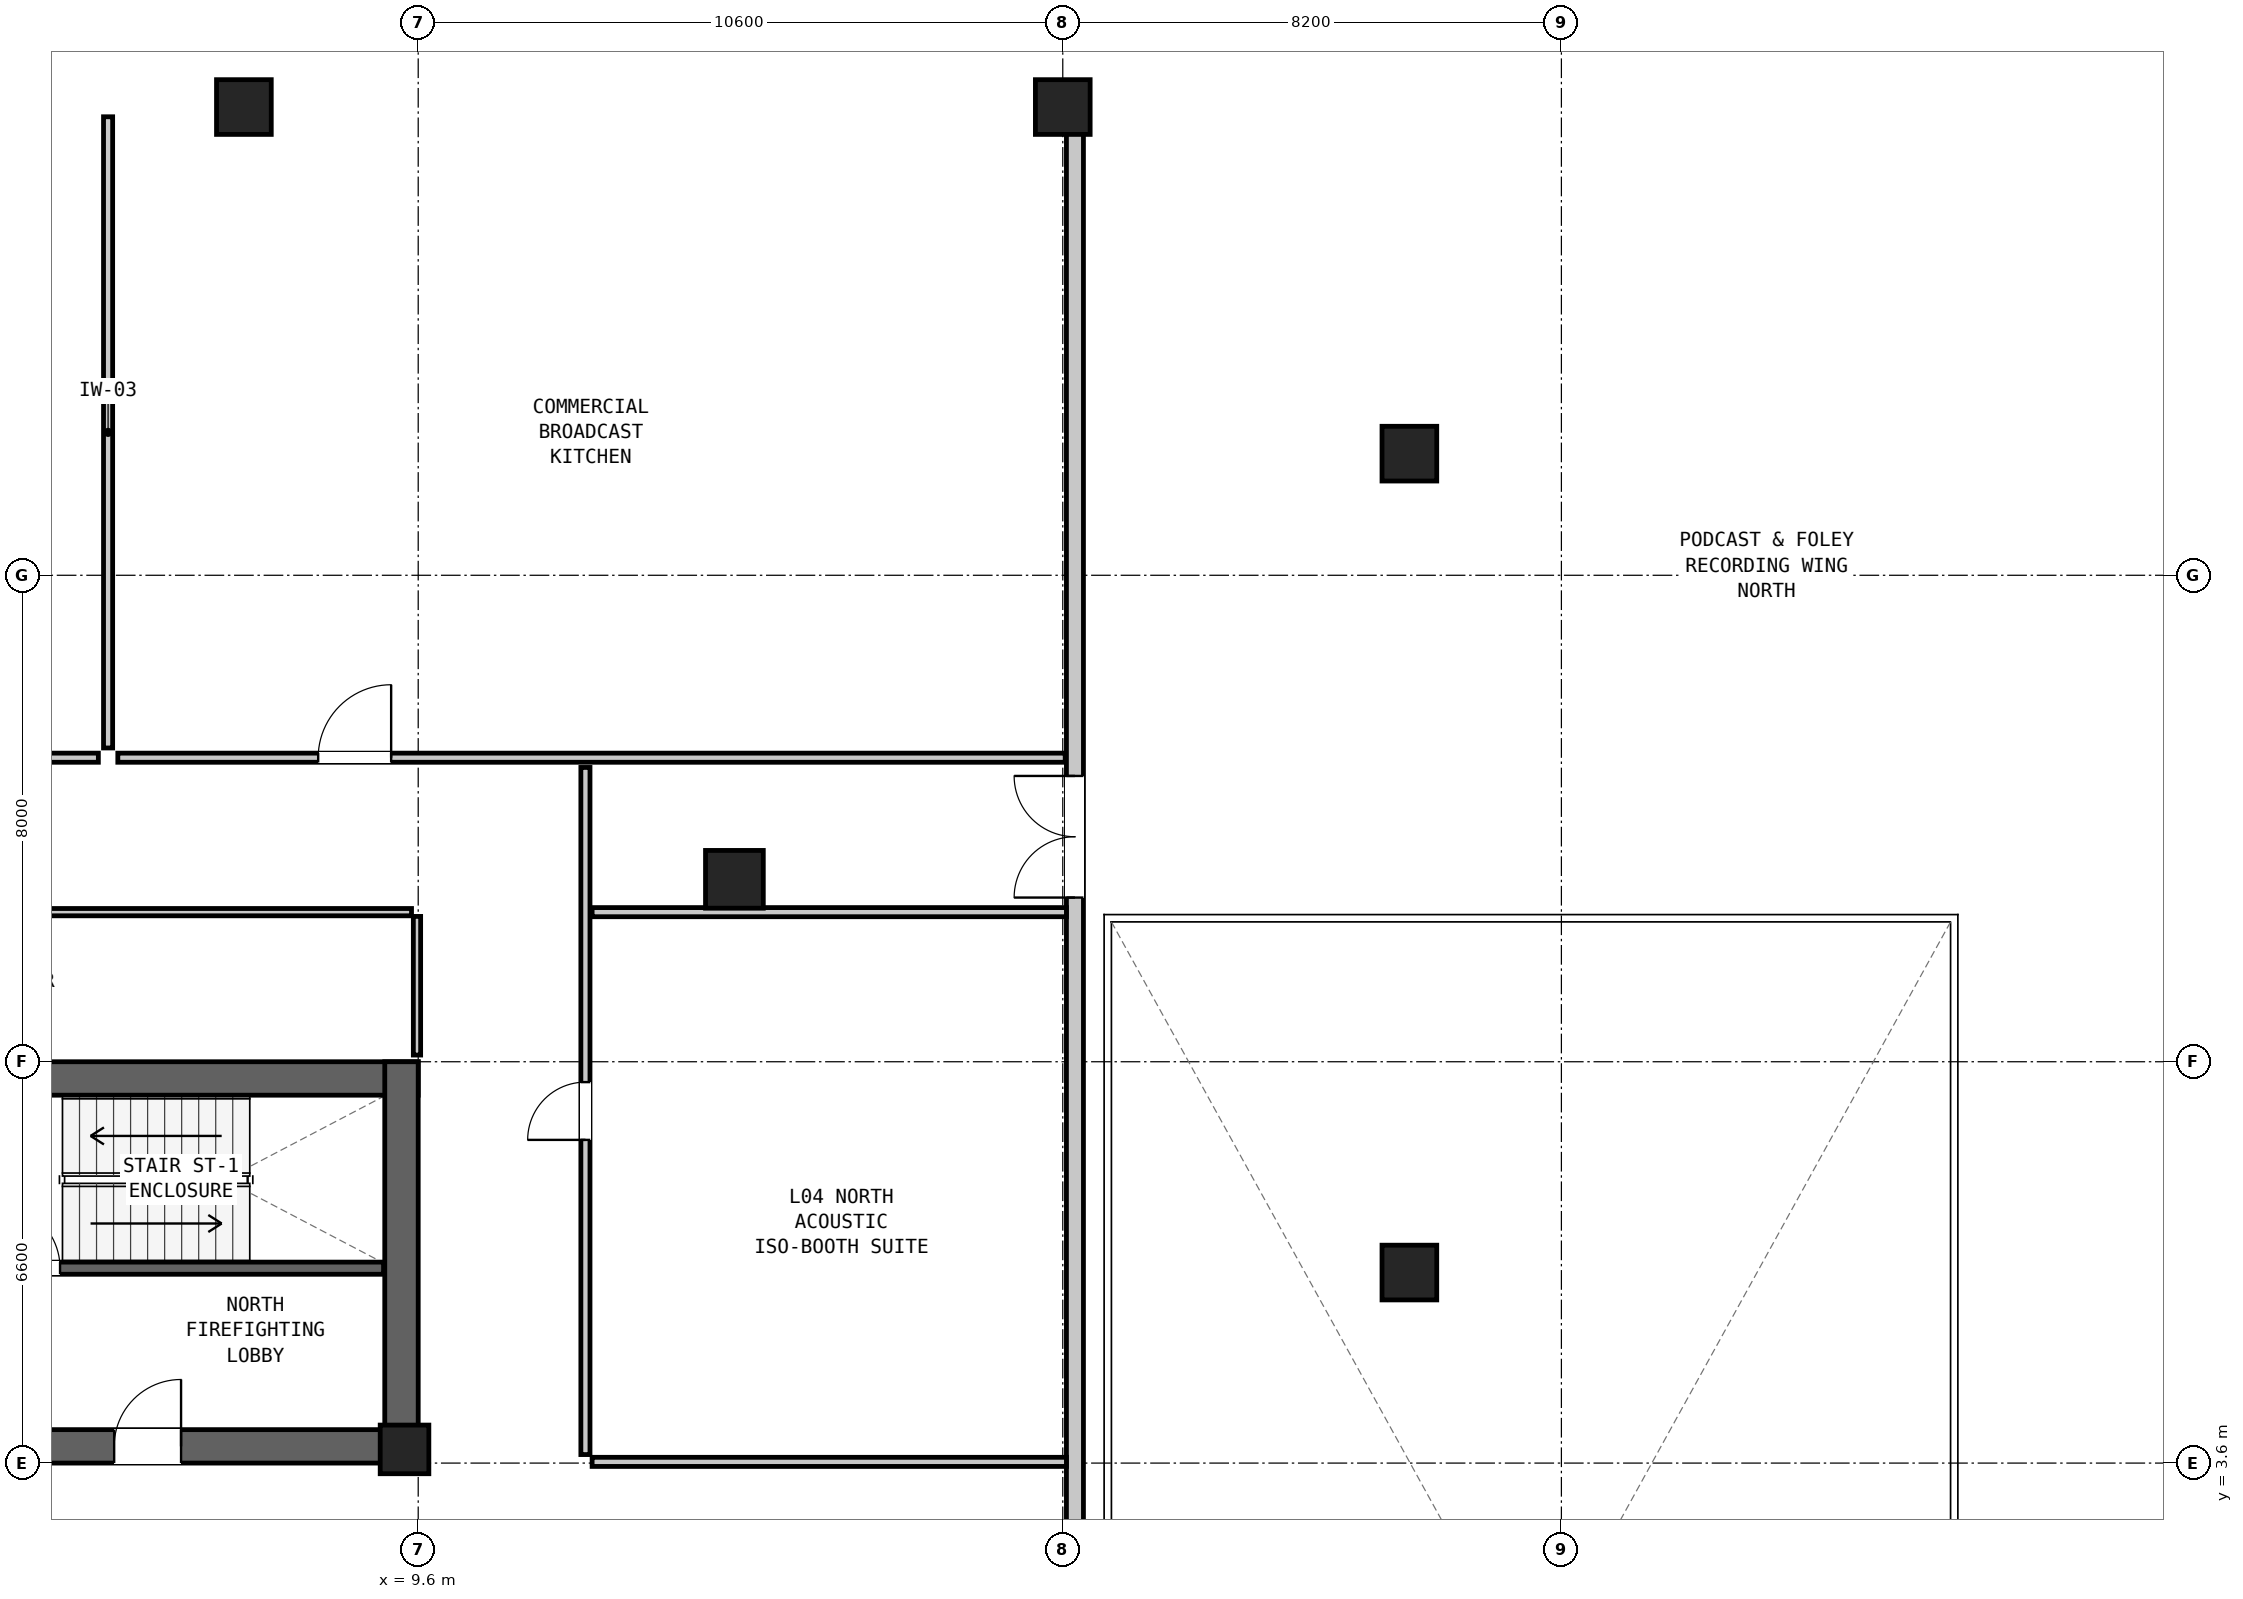
"""IFC4 building model, lengths in metres.
Left out: names, types, materials, properties, quantities, classifications, styles, units other than length and angle.
Written with IfcOpenShell. Run it as: python <this file> out.ifc"""

import sys

from ifc_helpers import new_model, si_unit, direction, frame, frame_2d, origin, origin_2d, place, context, subcontext, project, spatial, rectangle, hollow_rectangle, extrude, element, fill, save


model = new_model("IFC4")
c1 = context("Model", 3, precision=1e-05, world=origin(), true_north=direction((0.0, 1.0)))
c2 = subcontext(c1, "Body", "Model", "MODEL_VIEW")
j1 = project(units=[si_unit("LENGTHUNIT", "METRE"), si_unit("PLANEANGLEUNIT", "RADIAN")], contexts=[c1])
p1 = place(None, origin())
s1 = spatial("IfcSite", under=j1, at=p1, CompositionType="ELEMENT")
p2 = place(p1, origin())
s2 = spatial("IfcBuilding", under=s1, at=p2, CompositionType="ELEMENT")
p3 = place(p2, frame((0.0, 0.0, 17.7)))
s3 = spatial("IfcBuildingStorey", under=s2, at=p3, CompositionType="ELEMENT", Elevation=17.7)
p4 = place(p3, frame((-9.6, 9.925, 0.0), z_axis=(0.0, 0.0, 1.0), x_axis=(1.0, 0.0, 0.0)))
e1 = element("IfcWall", 1, at=p4, inside=s3, PredefinedType="SHEAR", context=c2, shape_type="SweptSolid", body=[
    extrude(rectangle(XDim=19.2, YDim=0.55, at=frame_2d((9.6, 0.0))), origin(), (0.0, 0.0, 1.0), 4.2),
])
p5 = place(p3, frame((-9.6, 3.875, 0.0), z_axis=(0.0, 0.0, 1.0), x_axis=(1.0, 0.0, 0.0)))
e2 = element("IfcWall", 2, at=p5, inside=s3, PredefinedType="SHEAR", context=c2, shape_type="SweptSolid", body=[
    extrude(rectangle(XDim=19.2, YDim=0.55, at=frame_2d((9.6, 0.0))), origin(), (0.0, 0.0, 1.0), 4.2),
])
p6 = place(p5, frame((14.2, 0.0, 0.0)))
e3 = element("IfcOpeningElement", 3, at=p6, cuts=e2, PredefinedType="OPENING", context=c2, shape_type="SweptSolid", body=[
    extrude(rectangle(XDim=1.1, YDim=2.08, at=frame_2d((0.55, 1.04))), frame((0.0, 0.287, 0.0), z_axis=(0.0, -1.0, 0.0), x_axis=(1.0, 0.0, 0.0)), (0.0, 0.0, 1.0), 0.574),
])
p7 = place(p5, frame((8.2, 0.0, 0.0)))
e4 = element("IfcOpeningElement", 4, at=p7, cuts=e2, PredefinedType="OPENING", context=c2, shape_type="SweptSolid", body=[
    extrude(rectangle(XDim=1.15, YDim=2.1, at=frame_2d((0.575, 1.05))), frame((0.0, 0.287, 0.0), z_axis=(0.0, -1.0, 0.0), x_axis=(1.0, 0.0, 0.0)), (0.0, 0.0, 1.0), 0.574),
])
p8 = place(p5, frame((2.5, 0.0, 0.0)))
e5 = element("IfcOpeningElement", 5, at=p8, cuts=e2, PredefinedType="OPENING", context=c2, shape_type="SweptSolid", body=[
    extrude(rectangle(XDim=1.6, YDim=2.12, at=frame_2d((0.8, 1.06))), frame((0.0, 0.287, 0.0), z_axis=(0.0, -1.0, 0.0), x_axis=(1.0, 0.0, 0.0)), (0.0, 0.0, 1.0), 0.574),
])
p9 = place(p3, frame((9.325, 3.6, 0.0), z_axis=(0.0, 0.0, 1.0), x_axis=(0.0, 1.0, 0.0)))
e6 = element("IfcWall", 6, at=p9, inside=s3, PredefinedType="SHEAR", context=c2, shape_type="SweptSolid", body=[
    extrude(rectangle(XDim=6.6, YDim=0.55, at=frame_2d((3.3, 0.0))), origin(), (0.0, 0.0, 1.0), 4.2),
])
p10 = place(p3, frame((14.8, 13.2, 0.0), z_axis=(0.0, 0.0, 1.0), x_axis=(1.0, 0.0, 0.0)))
e7 = element("IfcColumn", 7, at=p10, inside=s3, PredefinedType="COLUMN", context=c2, shape_type="SweptSolid", body=[
    extrude(hollow_rectangle(XDim=0.95, YDim=0.95, WallThickness=0.06, at=origin_2d()), origin(), (0.0, 0.0, 1.0), 4.2),
])
for number, where, z_axis, x_axis in (
    (8, (25.9, 6.733, 0.0), (0.0, 0.0, 1.0), (0.0, 1.0, 0.0)),
    (9, (25.9, 20.2, 0.0), (0.0, 0.0, 1.0), (0.0, 1.0, 0.0)),
    (10, (20.2, 25.9, 0.0), (0.0, 0.0, 1.0), (1.0, 0.0, 0.0)),
    (11, (6.733, 25.9, 0.0), (0.0, 0.0, 1.0), (1.0, 0.0, 0.0)),
):
    element("IfcColumn", number, at=place(p3, frame(where, z_axis=z_axis, x_axis=x_axis)), inside=s3, PredefinedType="COLUMN", context=c2, shape_type="SweptSolid", body=[
        extrude(hollow_rectangle(XDim=0.9, YDim=0.9, WallThickness=0.055, at=origin_2d()), origin(), (0.0, 0.0, 1.0), 4.2),
    ])
p11 = place(p3, frame((9.375, 3.825, 0.0), z_axis=(0.0, 0.0, 1.0), x_axis=(1.0, 0.0, 0.0)))
e12 = element("IfcColumn", 12, at=p11, inside=s3, PredefinedType="COLUMN", context=c2, shape_type="SweptSolid", body=[
    extrude(rectangle(XDim=0.8, YDim=0.8, at=origin_2d()), origin(), (0.0, 0.0, 1.0), 4.2),
])
p12 = place(p3, frame((2.36, 6.805, 0.0), z_axis=(0.0, 0.0, 1.0), x_axis=(1.0, 0.0, 0.0)))
e13 = element("IfcWall", 13, at=p12, inside=s3, PredefinedType="SHEAR", context=c2, shape_type="SweptSolid", body=[
    extrude(rectangle(XDim=6.67, YDim=0.2, at=frame_2d((3.335, 0.0))), origin(), (0.0, 0.0, 1.0), 3.82),
])
p13 = place(p12, frame((0.3, 0.0, 0.0)))
e14 = element("IfcOpeningElement", 14, at=p13, cuts=e13, PredefinedType="OPENING", context=c2, shape_type="SweptSolid", body=[
    extrude(rectangle(XDim=1.05, YDim=2.08, at=frame_2d((0.525, 1.04))), frame((0.0, 0.112, 0.0), z_axis=(0.0, -1.0, 0.0), x_axis=(1.0, 0.0, 0.0)), (0.0, 0.0, 1.0), 0.224),
])
p14 = place(p3, frame((20.4, -25.74, 0.0), z_axis=(0.0, 0.0, 1.0), x_axis=(0.0, 1.0, 0.0)))
e15 = element("IfcWall", 15, at=p14, inside=s3, PredefinedType="MOVABLE", context=c2, shape_type="SweptSolid", body=[
    extrude(rectangle(XDim=51.48, YDim=0.28, at=frame_2d((25.74, 0.0))), origin(), (0.0, 0.0, 1.0), 3.193),
])
p15 = place(p14, frame((11.149, 0.0, 0.0)))
e16 = element("IfcOpeningElement", 16, at=p15, cuts=e15, PredefinedType="OPENING", context=c2, shape_type="SweptSolid", body=[
    extrude(rectangle(XDim=2.0, YDim=2.14, at=frame_2d((1.0, 1.07))), frame((0.0, 0.152, 0.0), z_axis=(0.0, -1.0, 0.0), x_axis=(1.0, 0.0, 0.0)), (0.0, 0.0, 1.0), 0.304),
])
p16 = place(p14, frame((38.64, 0.0, 0.0)))
e17 = element("IfcOpeningElement", 17, at=p16, cuts=e15, PredefinedType="OPENING", context=c2, shape_type="SweptSolid", body=[
    extrude(rectangle(XDim=2.0, YDim=2.14, at=frame_2d((1.0, 1.07))), frame((0.0, 0.152, 0.0), z_axis=(0.0, -1.0, 0.0), x_axis=(1.0, 0.0, 0.0)), (0.0, 0.0, 1.0), 0.304),
])
p17 = place(p3, frame((-28.24, 15.2, 0.0), z_axis=(0.0, 0.0, 1.0), x_axis=(1.0, 0.0, 0.0)))
e18 = element("IfcWall", 18, at=p17, inside=s3, PredefinedType="PARTITIONING", context=c2, shape_type="SweptSolid", body=[
    extrude(rectangle(XDim=32.58, YDim=0.15, at=frame_2d((16.29, 0.0))), origin(), (0.0, 0.0, 1.0), 3.82),
])
p18 = place(p17, frame((24.812, 0.0, 0.0)))
e19 = element("IfcOpeningElement", 19, at=p18, cuts=e18, PredefinedType="OPENING", context=c2, shape_type="SweptSolid", body=[
    extrude(rectangle(XDim=1.2, YDim=2.1, at=frame_2d((0.6, 1.05))), frame((0.0, 0.087, 0.0), z_axis=(0.0, -1.0, 0.0), x_axis=(1.0, 0.0, 0.0)), (0.0, 0.0, 1.0), 0.174),
])
p19 = place(p3, frame((4.66, 15.2, 0.0), z_axis=(0.0, 0.0, 1.0), x_axis=(1.0, 0.0, 0.0)))
e20 = element("IfcWall", 20, at=p19, inside=s3, PredefinedType="PARTITIONING", context=c2, shape_type="SweptSolid", body=[
    extrude(rectangle(XDim=15.58, YDim=0.15, at=frame_2d((7.79, 0.0))), origin(), (0.0, 0.0, 1.0), 3.82),
])
p20 = place(p19, frame((3.295, 0.0, 0.0)))
e21 = element("IfcOpeningElement", 21, at=p20, cuts=e20, PredefinedType="OPENING", context=c2, shape_type="SweptSolid", body=[
    extrude(rectangle(XDim=1.2, YDim=2.1, at=frame_2d((0.6, 1.05))), frame((0.0, 0.087, 0.0), z_axis=(0.0, -1.0, 0.0), x_axis=(1.0, 0.0, 0.0)), (0.0, 0.0, 1.0), 0.174),
])
p21 = place(p3, frame((4.5, 15.36, 0.0), z_axis=(0.0, 0.0, 1.0), x_axis=(0.0, 1.0, 0.0)))
e22 = element("IfcWall", 22, at=p21, inside=s3, PredefinedType="PARTITIONING", context=c2, shape_type="SweptSolid", body=[
    extrude(rectangle(XDim=10.38, YDim=0.15, at=frame_2d((5.19, 0.0))), origin(), (0.0, 0.0, 1.0), 3.82),
])
p22 = place(p3, frame((12.35, 3.74, 0.0), z_axis=(0.0, 0.0, 1.0), x_axis=(0.0, 1.0, 0.0)))
e23 = element("IfcWall", 23, at=p22, inside=s3, PredefinedType="PARTITIONING", context=c2, shape_type="SweptSolid", body=[
    extrude(rectangle(XDim=11.3, YDim=0.15, at=frame_2d((5.65, 0.0))), origin(), (0.0, 0.0, 1.0), 3.82),
])
p23 = place(p22, frame((5.175, 0.0, 0.0)))
e24 = element("IfcOpeningElement", 24, at=p23, cuts=e23, PredefinedType="OPENING", context=c2, shape_type="SweptSolid", body=[
    extrude(rectangle(XDim=0.95, YDim=2.1, at=frame_2d((0.475, 1.05))), frame((0.0, 0.087, 0.0), z_axis=(0.0, -1.0, 0.0), x_axis=(1.0, 0.0, 0.0)), (0.0, 0.0, 1.0), 0.174),
])
p24 = place(p3, frame((12.46, 3.62, 0.0), z_axis=(0.0, 0.0, 1.0), x_axis=(1.0, 0.0, 0.0)))
e25 = element("IfcWall", 25, at=p24, inside=s3, PredefinedType="PARTITIONING", context=c2, shape_type="SweptSolid", body=[
    extrude(rectangle(XDim=7.8, YDim=0.15, at=frame_2d((3.9, 0.0))), origin(), (0.0, 0.0, 1.0), 2.682),
])
p25 = place(p3, frame((-9.49, 12.66, 0.0), z_axis=(0.0, 0.0, 1.0), x_axis=(1.0, 0.0, 0.0)))
e26 = element("IfcWall", 26, at=p25, inside=s3, PredefinedType="PARTITIONING", context=c2, shape_type="SweptSolid", body=[
    extrude(rectangle(XDim=18.98, YDim=0.12, at=frame_2d((9.49, 0.0))), origin(), (0.0, 0.0, 1.0), 3.82),
])
p26 = place(p25, frame((9.015, 0.0, 0.0)))
e27 = element("IfcOpeningElement", 27, at=p26, cuts=e26, PredefinedType="OPENING", context=c2, shape_type="SweptSolid", body=[
    extrude(rectangle(XDim=0.9, YDim=2.05, at=frame_2d((0.45, 1.025))), frame((0.0, 0.072, 0.0), z_axis=(0.0, -1.0, 0.0), x_axis=(1.0, 0.0, 0.0)), (0.0, 0.0, 1.0), 0.144),
])
p27 = place(p3, frame((9.58, 10.31, 0.0), z_axis=(0.0, 0.0, 1.0), x_axis=(0.0, 1.0, 0.0)))
e28 = element("IfcWall", 28, at=p27, inside=s3, PredefinedType="PARTITIONING", context=c2, shape_type="SweptSolid", body=[
    extrude(rectangle(XDim=2.28, YDim=0.12, at=frame_2d((1.14, 0.0))), origin(), (0.0, 0.0, 1.0), 3.82),
])
p28 = place(p3, frame((12.46, 12.66, 0.0), z_axis=(0.0, 0.0, 1.0), x_axis=(1.0, 0.0, 0.0)))
e29 = element("IfcWall", 29, at=p28, inside=s3, PredefinedType="PARTITIONING", context=c2, shape_type="SweptSolid", body=[
    extrude(rectangle(XDim=7.8, YDim=0.15, at=frame_2d((3.9, 0.0))), origin(), (0.0, 0.0, 1.0), 3.82),
])
p29 = place(p13, origin())
e30 = element("IfcDoor", 30, at=p29, inside=s3, OperationType="SINGLE_SWING_LEFT", PredefinedType="DOOR", context=c2, shape_type="SweptSolid", body=[
    extrude(rectangle(XDim=1.05, YDim=2.08, at=frame_2d((0.525, 1.04))), frame((0.0, 0.025, 0.0), z_axis=(0.0, -1.0, 0.0), x_axis=(1.0, 0.0, 0.0)), (0.0, 0.0, 1.0), 0.05),
])
fill(e14, e30)
p30 = place(p6, origin())
e31 = element("IfcDoor", 31, at=p30, inside=s3, OperationType="SINGLE_SWING_RIGHT", PredefinedType="DOOR", context=c2, shape_type="SweptSolid", body=[
    extrude(rectangle(XDim=1.1, YDim=2.08, at=frame_2d((0.55, 1.04))), frame((0.0, 0.025, 0.0), z_axis=(0.0, -1.0, 0.0), x_axis=(1.0, 0.0, 0.0)), (0.0, 0.0, 1.0), 0.05),
])
fill(e3, e31)
p31 = place(p16, origin())
e32 = element("IfcDoor", 32, at=p31, inside=s3, OperationType="DOUBLE_DOOR_SINGLE_SWING", PredefinedType="DOOR", context=c2, shape_type="SweptSolid", body=[
    extrude(rectangle(XDim=2.0, YDim=2.14, at=frame_2d((1.0, 1.07))), frame((0.0, 0.025, 0.0), z_axis=(0.0, -1.0, 0.0), x_axis=(1.0, 0.0, 0.0)), (0.0, 0.0, 1.0), 0.05),
])
fill(e17, e32)
p32 = place(p20, origin())
e33 = element("IfcDoor", 33, at=p32, inside=s3, OperationType="SINGLE_SWING_RIGHT", PredefinedType="DOOR", context=c2, shape_type="SweptSolid", body=[
    extrude(rectangle(XDim=1.2, YDim=2.1, at=frame_2d((0.6, 1.05))), frame((0.0, 0.025, 0.0), z_axis=(0.0, -1.0, 0.0), x_axis=(1.0, 0.0, 0.0)), (0.0, 0.0, 1.0), 0.05),
])
fill(e21, e33)
p33 = place(p23, origin())
e34 = element("IfcDoor", 34, at=p33, inside=s3, OperationType="SINGLE_SWING_LEFT", PredefinedType="DOOR", context=c2, shape_type="SweptSolid", body=[
    extrude(rectangle(XDim=0.95, YDim=2.1, at=frame_2d((0.475, 1.05))), frame((0.0, 0.025, 0.0), z_axis=(0.0, -1.0, 0.0), x_axis=(1.0, 0.0, 0.0)), (0.0, 0.0, 1.0), 0.05),
])
fill(e24, e34)
save(model, sys.argv[1])
